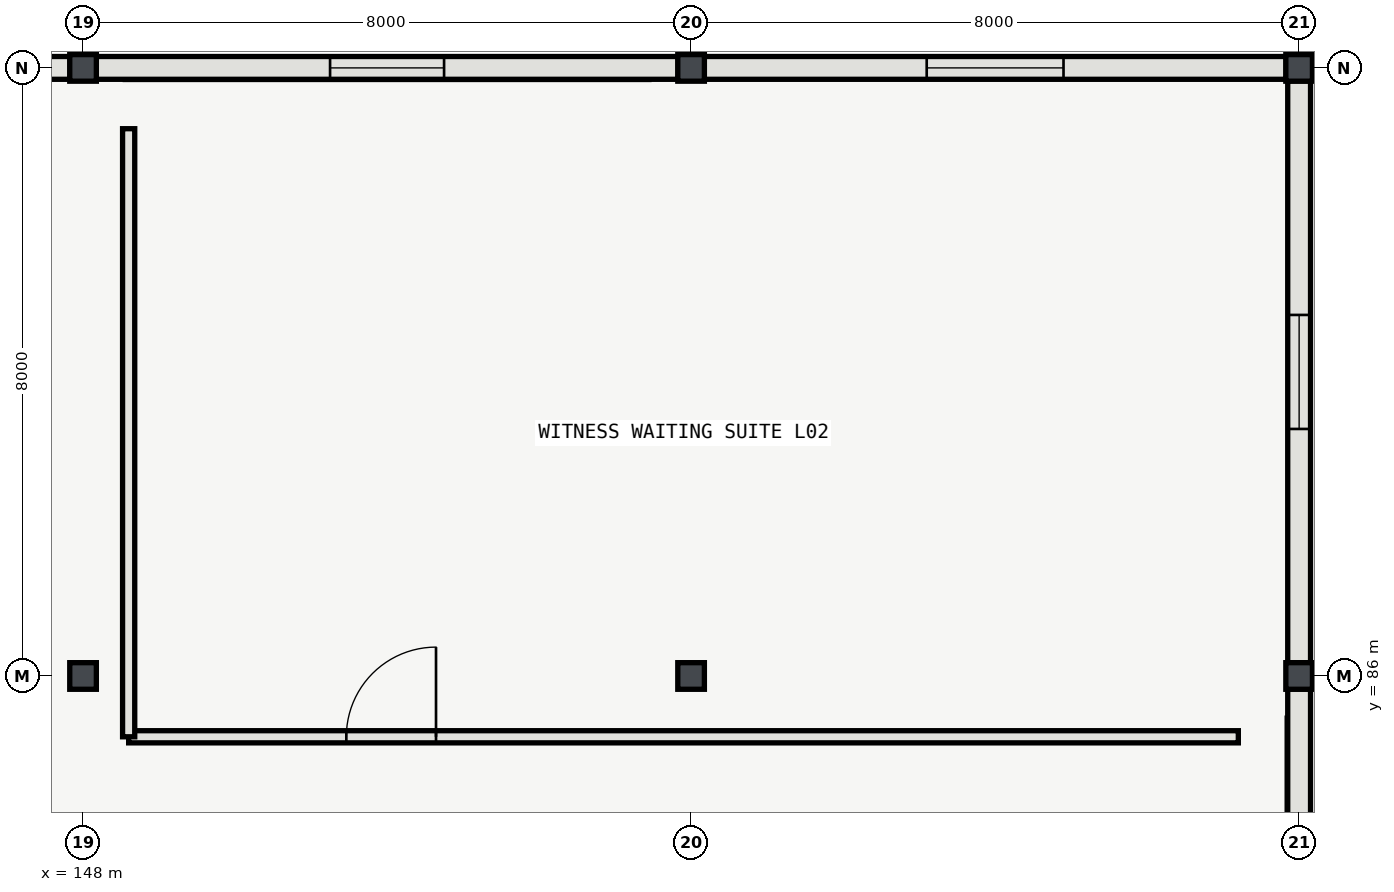
"""IFC4 building model, lengths in metres.
Left out: names, types, materials, properties, quantities, classifications, styles, units other than length and angle.
Written with IfcOpenShell. Run it as: python <this file> out.ifc"""

import sys

from ifc_helpers import new_model, si_unit, direction, frame, frame_2d, origin, origin_2d, place, context, subcontext, project, spatial, rectangle, i_section, extrude, element, fill, save


model = new_model("IFC4")
c1 = context("Model", 3, precision=1e-05, world=origin(), true_north=direction((0.0, 1.0)))
c2 = subcontext(c1, "Body", "Model", "MODEL_VIEW")
j1 = project(units=[si_unit("LENGTHUNIT", "METRE"), si_unit("PLANEANGLEUNIT", "RADIAN")], contexts=[c1])
p1 = place(None, origin())
s1 = spatial("IfcSite", under=j1, at=p1, CompositionType="ELEMENT")
p2 = place(p1, origin())
s2 = spatial("IfcBuilding", under=s1, at=p2, CompositionType="ELEMENT")
p3 = place(p2, frame((0.0, 0.0, 10.8)))
s3 = spatial("IfcBuildingStorey", under=s2, at=p3, CompositionType="ELEMENT", Elevation=10.8)
for number, where, z_axis, x_axis in (
    (1, (148.0, 86.0, 0.0), (0.0, 0.0, 1.0), (1.0, 0.0, 0.0)),
    (2, (148.0, 94.0, 0.0), (0.0, 0.0, 1.0), (1.0, 0.0, 0.0)),
    (3, (156.0, 86.0, 0.0), (0.0, 0.0, 1.0), (1.0, 0.0, 0.0)),
    (4, (156.0, 94.0, 0.0), (0.0, 0.0, 1.0), (1.0, 0.0, 0.0)),
    (5, (164.0, 86.0, 0.0), (0.0, 0.0, 1.0), (1.0, 0.0, 0.0)),
    (6, (164.0, 94.0, 0.0), (0.0, 0.0, 1.0), (1.0, 0.0, 0.0)),
):
    element("IfcColumn", number, at=place(p3, frame(where, z_axis=z_axis, x_axis=x_axis)), inside=s3, PredefinedType="COLUMN", context=c2, shape_type="SweptSolid", body=[
        extrude(i_section(OverallWidth=0.35, OverallDepth=0.35, WebThickness=0.012, FlangeThickness=0.019, FilletRadius=0.02, at=origin_2d()), origin(), (0.0, 0.0, 1.0), 5.4),
    ])
p4 = place(p3, frame((147.829, 94.0, 0.0), z_axis=(0.0, 0.0, 1.0), x_axis=(-1.0, 0.0, 0.0)))
e7 = element("IfcWall", 7, at=p4, inside=s3, PredefinedType="SOLIDWALL", context=c2, shape_type="SweptSolid", body=[
    extrude(rectangle(XDim=7.658, YDim=0.3, at=frame_2d((3.829, 0.0))), origin(), (0.0, 0.0, 1.0), 4.763),
])
p5 = place(p4, frame((2.329, 0.0, 0.95)))
e8 = element("IfcOpeningElement", 8, at=p5, cuts=e7, PredefinedType="OPENING", context=c2, shape_type="SweptSolid", body=[
    extrude(rectangle(XDim=3.0, YDim=2.1, at=frame_2d((1.5, 1.05))), frame((0.0, 0.16, 0.0), z_axis=(0.0, -1.0, 0.0), x_axis=(1.0, 0.0, 0.0)), (0.0, 0.0, 1.0), 0.32),
])
p6 = place(p3, frame((155.829, 94.0, 0.0), z_axis=(0.0, 0.0, 1.0), x_axis=(-1.0, 0.0, 0.0)))
e9 = element("IfcWall", 9, at=p6, inside=s3, PredefinedType="SOLIDWALL", context=c2, shape_type="SweptSolid", body=[
    extrude(rectangle(XDim=7.658, YDim=0.3, at=frame_2d((3.829, 0.0))), origin(), (0.0, 0.0, 1.0), 4.763),
])
p7 = place(p6, frame((3.079, 0.0, 0.95)))
e10 = element("IfcOpeningElement", 10, at=p7, cuts=e9, PredefinedType="OPENING", context=c2, shape_type="SweptSolid", body=[
    extrude(rectangle(XDim=1.5, YDim=2.4, at=frame_2d((0.75, 1.2))), frame((0.0, 0.16, 0.0), z_axis=(0.0, -1.0, 0.0), x_axis=(1.0, 0.0, 0.0)), (0.0, 0.0, 1.0), 0.32),
])
p8 = place(p3, frame((163.829, 94.0, 0.0), z_axis=(0.0, 0.0, 1.0), x_axis=(-1.0, 0.0, 0.0)))
e11 = element("IfcWall", 11, at=p8, inside=s3, PredefinedType="SOLIDWALL", context=c2, shape_type="SweptSolid", body=[
    extrude(rectangle(XDim=7.658, YDim=0.3, at=frame_2d((3.829, 0.0))), origin(), (0.0, 0.0, 1.0), 4.763),
])
p9 = place(p8, frame((2.929, 0.0, 0.95)))
e12 = element("IfcOpeningElement", 12, at=p9, cuts=e11, PredefinedType="OPENING", context=c2, shape_type="SweptSolid", body=[
    extrude(rectangle(XDim=1.8, YDim=2.4, at=frame_2d((0.9, 1.2))), frame((0.0, 0.16, 0.0), z_axis=(0.0, -1.0, 0.0), x_axis=(1.0, 0.0, 0.0)), (0.0, 0.0, 1.0), 0.32),
])
p10 = place(p3, frame((164.0, 78.171, 0.0), z_axis=(0.0, 0.0, 1.0), x_axis=(0.0, 1.0, 0.0)))
e13 = element("IfcWall", 13, at=p10, inside=s3, PredefinedType="SOLIDWALL", context=c2, shape_type="SweptSolid", body=[
    extrude(rectangle(XDim=7.658, YDim=0.3, at=frame_2d((3.829, 0.0))), origin(), (0.0, 0.0, 1.0), 4.763),
])
p11 = place(p10, frame((2.629, 0.0, 0.95)))
e14 = element("IfcOpeningElement", 14, at=p11, cuts=e13, PredefinedType="OPENING", context=c2, shape_type="SweptSolid", body=[
    extrude(rectangle(XDim=2.4, YDim=2.6, at=frame_2d((1.2, 1.3))), frame((0.0, 0.16, 0.0), z_axis=(0.0, -1.0, 0.0), x_axis=(1.0, 0.0, 0.0)), (0.0, 0.0, 1.0), 0.32),
])
p12 = place(p3, frame((164.0, 86.171, 0.0), z_axis=(0.0, 0.0, 1.0), x_axis=(0.0, 1.0, 0.0)))
e15 = element("IfcWall", 15, at=p12, inside=s3, PredefinedType="SOLIDWALL", context=c2, shape_type="SweptSolid", body=[
    extrude(rectangle(XDim=7.658, YDim=0.3, at=frame_2d((3.829, 0.0))), origin(), (0.0, 0.0, 1.0), 4.763),
])
p13 = place(p12, frame((3.079, 0.0, 0.95)))
e16 = element("IfcOpeningElement", 16, at=p13, cuts=e15, PredefinedType="OPENING", context=c2, shape_type="SweptSolid", body=[
    extrude(rectangle(XDim=1.5, YDim=1.2, at=frame_2d((0.75, 0.6))), frame((0.0, 0.16, 0.0), z_axis=(0.0, -1.0, 0.0), x_axis=(1.0, 0.0, 0.0)), (0.0, 0.0, 1.0), 0.32),
])
p14 = place(p3, frame((148.6, 85.2, 0.0), z_axis=(0.0, 0.0, 1.0), x_axis=(1.0, 0.0, 0.0)))
e17 = element("IfcWall", 17, at=p14, inside=s3, PredefinedType="PARTITIONING", context=c2, shape_type="SweptSolid", body=[
    extrude(rectangle(XDim=14.6, YDim=0.16, at=frame_2d((7.3, 0.0))), origin(), (0.0, 0.0, 1.0), 5.12),
])
p15 = place(p14, frame((2.864, 0.0, 0.0)))
e18 = element("IfcOpeningElement", 18, at=p15, cuts=e17, PredefinedType="OPENING", context=c2, shape_type="SweptSolid", body=[
    extrude(rectangle(XDim=1.18, YDim=2.2, at=frame_2d((0.59, 1.1))), frame((0.0, 0.09, 0.0), z_axis=(0.0, -1.0, 0.0), x_axis=(1.0, 0.0, 0.0)), (0.0, 0.0, 1.0), 0.18),
])
p16 = place(p3, frame((148.6, 93.2, 0.0), z_axis=(0.0, 0.0, 1.0), x_axis=(0.0, -1.0, 0.0)))
e19 = element("IfcWall", 19, at=p16, inside=s3, PredefinedType="PARTITIONING", context=c2, shape_type="SweptSolid", body=[
    extrude(rectangle(XDim=8.0, YDim=0.16, at=frame_2d((4.0, 0.0))), origin(), (0.0, 0.0, 1.0), 5.12),
])
p17 = place(p7, origin())
e20 = element("IfcWindow", 20, at=p17, inside=s3, PartitioningType="SINGLE_PANEL", PredefinedType="WINDOW", context=c2, shape_type="SweptSolid", body=[
    extrude(rectangle(XDim=1.5, YDim=2.4, at=frame_2d((0.75, 1.2))), frame((0.0, 0.03, 0.0), z_axis=(0.0, -1.0, 0.0), x_axis=(1.0, 0.0, 0.0)), (0.0, 0.0, 1.0), 0.06),
])
fill(e10, e20)
p18 = place(p9, origin())
e21 = element("IfcWindow", 21, at=p18, inside=s3, PartitioningType="SINGLE_PANEL", PredefinedType="WINDOW", context=c2, shape_type="SweptSolid", body=[
    extrude(rectangle(XDim=1.8, YDim=2.4, at=frame_2d((0.9, 1.2))), frame((0.0, 0.03, 0.0), z_axis=(0.0, -1.0, 0.0), x_axis=(1.0, 0.0, 0.0)), (0.0, 0.0, 1.0), 0.06),
])
fill(e12, e21)
p19 = place(p13, origin())
e22 = element("IfcWindow", 22, at=p19, inside=s3, PartitioningType="SINGLE_PANEL", PredefinedType="WINDOW", context=c2, shape_type="SweptSolid", body=[
    extrude(rectangle(XDim=1.5, YDim=1.2, at=frame_2d((0.75, 0.6))), frame((0.0, 0.03, 0.0), z_axis=(0.0, -1.0, 0.0), x_axis=(1.0, 0.0, 0.0)), (0.0, 0.0, 1.0), 0.06),
])
fill(e16, e22)
p20 = place(p15, origin())
e23 = element("IfcDoor", 23, at=p20, inside=s3, OperationType="SINGLE_SWING_RIGHT", PredefinedType="DOOR", context=c2, shape_type="SweptSolid", body=[
    extrude(rectangle(XDim=1.18, YDim=2.2, at=frame_2d((0.59, 1.1))), frame((0.0, 0.025, 0.0), z_axis=(0.0, -1.0, 0.0), x_axis=(1.0, 0.0, 0.0)), (0.0, 0.0, 1.0), 0.05),
])
fill(e18, e23)
save(model, sys.argv[1])
